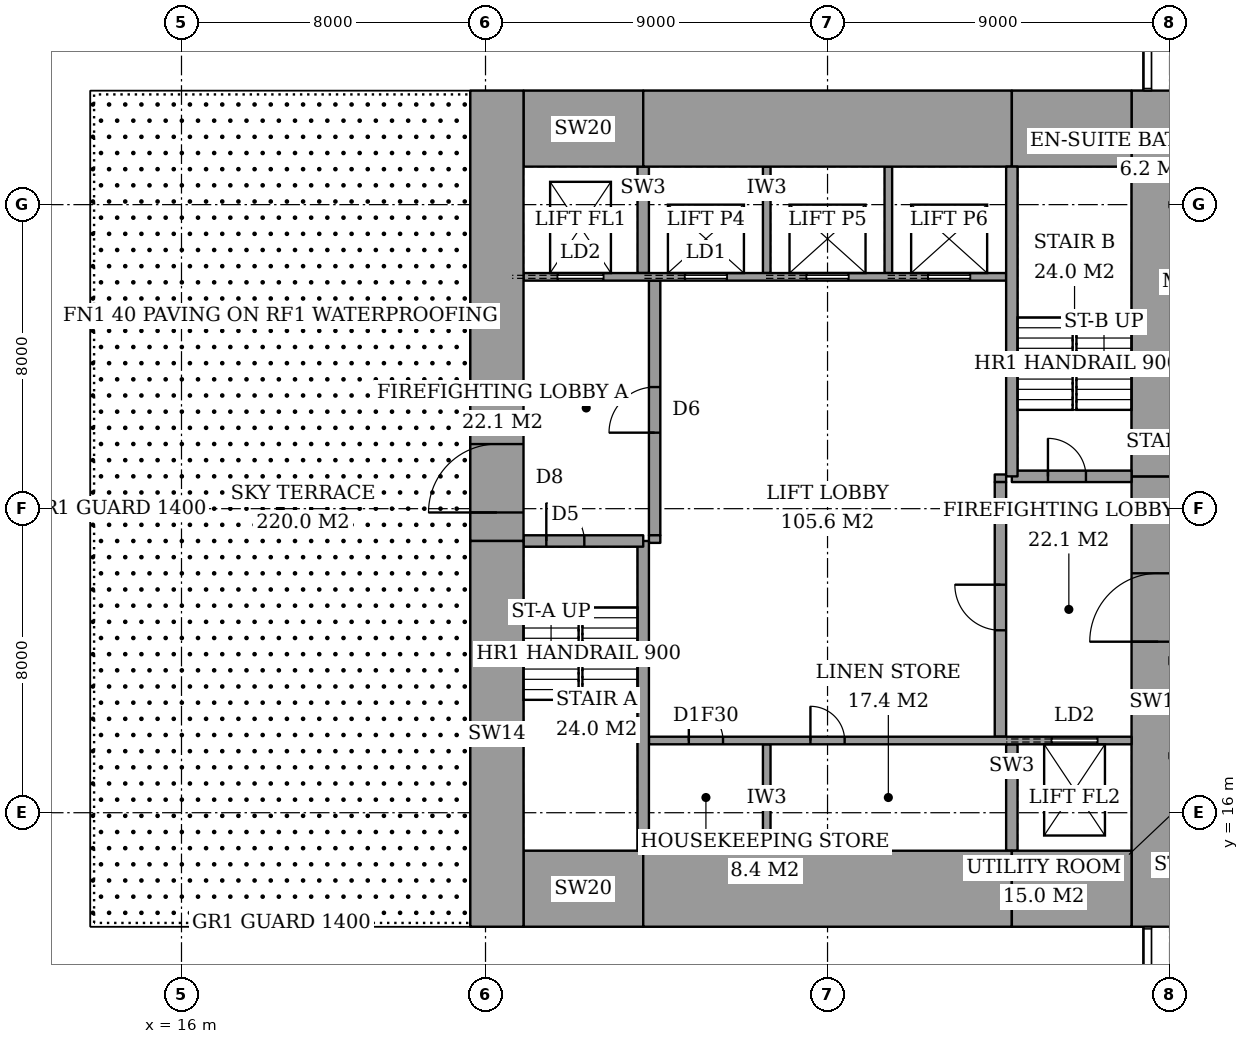
"""IFC4 building model, lengths in metres.
Left out: names, types, materials, properties, quantities, classifications, styles, units other than length and angle.
Written with IfcOpenShell. Run it as: python <this file> out.ifc"""

import sys

from ifc_helpers import new_model, si_unit, direction, frame, frame_2d, origin, place, context, subcontext, project, spatial, rectangle, extrude, element, fill, save


model = new_model("IFC4")
c1 = context("Model", 3, precision=1e-05, world=origin(), true_north=direction((0.0, 1.0)))
c2 = subcontext(c1, "Body", "Model", "MODEL_VIEW")
j1 = project(units=[si_unit("LENGTHUNIT", "METRE"), si_unit("PLANEANGLEUNIT", "RADIAN")], contexts=[c1])
p1 = place(None, origin())
s1 = spatial("IfcSite", under=j1, at=p1, CompositionType="ELEMENT")
p2 = place(p1, origin())
s2 = spatial("IfcBuilding", under=s1, at=p2, CompositionType="ELEMENT")
p3 = place(p2, frame((0.0, 0.0, 230.4)))
s3 = spatial("IfcBuildingStorey", under=s2, at=p3, CompositionType="ELEMENT", Elevation=230.4)
p4 = place(p3, frame((25.0, 14.0, 0.0), z_axis=(0.0, 0.0, 1.0), x_axis=(1.0, 0.0, 0.0)))
e1 = element("IfcWall", 1, at=p4, inside=s3, PredefinedType="SHEAR", context=c2, shape_type="SweptSolid", body=[
    extrude(rectangle(XDim=3.15, YDim=2.0, at=frame_2d((1.575, 0.0))), origin(), (0.0, 0.0, 1.0), 3.6),
])
p5 = place(p3, frame((28.15, 14.0, 0.0), z_axis=(0.0, 0.0, 1.0), x_axis=(1.0, 0.0, 0.0)))
e2 = element("IfcWall", 2, at=p5, inside=s3, PredefinedType="SHEAR", context=c2, shape_type="SweptSolid", body=[
    extrude(rectangle(XDim=9.7, YDim=2.0, at=frame_2d((4.85, 0.0))), origin(), (0.0, 0.0, 1.0), 3.6),
])
for number, where, z_axis, x_axis in (
    (3, (37.85, 14.0, 0.0), (0.0, 0.0, 1.0), (1.0, 0.0, 0.0)),
    (4, (25.0, 34.0, 0.0), (0.0, 0.0, 1.0), (1.0, 0.0, 0.0)),
):
    element("IfcWall", number, at=place(p3, frame(where, z_axis=z_axis, x_axis=x_axis)), inside=s3, PredefinedType="SHEAR", context=c2, shape_type="SweptSolid", body=[
        extrude(rectangle(XDim=3.15, YDim=2.0, at=frame_2d((1.575, 0.0))), origin(), (0.0, 0.0, 1.0), 3.6),
    ])
p6 = place(p3, frame((28.15, 34.0, 0.0), z_axis=(0.0, 0.0, 1.0), x_axis=(1.0, 0.0, 0.0)))
e5 = element("IfcWall", 5, at=p6, inside=s3, PredefinedType="SHEAR", context=c2, shape_type="SweptSolid", body=[
    extrude(rectangle(XDim=9.7, YDim=2.0, at=frame_2d((4.85, 0.0))), origin(), (0.0, 0.0, 1.0), 3.6),
])
p7 = place(p3, frame((37.85, 34.0, 0.0), z_axis=(0.0, 0.0, 1.0), x_axis=(1.0, 0.0, 0.0)))
e6 = element("IfcWall", 6, at=p7, inside=s3, PredefinedType="SHEAR", context=c2, shape_type="SweptSolid", body=[
    extrude(rectangle(XDim=3.15, YDim=2.0, at=frame_2d((1.575, 0.0))), origin(), (0.0, 0.0, 1.0), 3.6),
])
p8 = place(p3, frame((24.3, 13.0, 0.0), z_axis=(0.0, 0.0, 1.0), x_axis=(0.0, 1.0, 0.0)))
e7 = element("IfcWall", 7, at=p8, inside=s3, PredefinedType="SHEAR", context=c2, shape_type="SweptSolid", body=[
    extrude(rectangle(XDim=10.15, YDim=1.4, at=frame_2d((5.075, 0.0))), origin(), (0.0, 0.0, 1.0), 3.6),
])
p9 = place(p3, frame((24.3, 23.15, 0.0), z_axis=(0.0, 0.0, 1.0), x_axis=(0.0, 1.0, 0.0)))
e8 = element("IfcWall", 8, at=p9, inside=s3, PredefinedType="SHEAR", context=c2, shape_type="SweptSolid", body=[
    extrude(rectangle(XDim=11.85, YDim=1.4, at=frame_2d((5.925, 0.0))), origin(), (0.0, 0.0, 1.0), 3.6),
])
p10 = place(p9, frame((0.75, 0.0, 0.0)))
e9 = element("IfcOpeningElement", 9, at=p10, cuts=e8, PredefinedType="OPENING", context=c2, shape_type="SweptSolid", body=[
    extrude(rectangle(XDim=1.8, YDim=2.4, at=frame_2d((0.9, 1.2))), frame((0.0, 0.71, 0.0), z_axis=(0.0, -1.0, 0.0), x_axis=(1.0, 0.0, 0.0)), (0.0, 0.0, 1.0), 1.42),
])
p11 = place(p3, frame((41.7, 13.0, 0.0), z_axis=(0.0, 0.0, 1.0), x_axis=(0.0, 1.0, 0.0)))
e10 = element("IfcWall", 10, at=p11, inside=s3, PredefinedType="SHEAR", context=c2, shape_type="SweptSolid", body=[
    extrude(rectangle(XDim=11.85, YDim=1.4, at=frame_2d((5.925, 0.0))), origin(), (0.0, 0.0, 1.0), 3.6),
])
p12 = place(p11, frame((7.5, 0.0, 0.0)))
e11 = element("IfcOpeningElement", 11, at=p12, cuts=e10, PredefinedType="OPENING", context=c2, shape_type="SweptSolid", body=[
    extrude(rectangle(XDim=1.8, YDim=2.4, at=frame_2d((0.9, 1.2))), frame((0.0, 0.71, 0.0), z_axis=(0.0, -1.0, 0.0), x_axis=(1.0, 0.0, 0.0)), (0.0, 0.0, 1.0), 1.42),
])
p13 = place(p3, frame((41.7, 24.85, 0.0), z_axis=(0.0, 0.0, 1.0), x_axis=(0.0, 1.0, 0.0)))
e12 = element("IfcWall", 12, at=p13, inside=s3, PredefinedType="SHEAR", context=c2, shape_type="SweptSolid", body=[
    extrude(rectangle(XDim=10.15, YDim=1.4, at=frame_2d((5.075, 0.0))), origin(), (0.0, 0.0, 1.0), 3.6),
])
p14 = place(p3, frame((28.15, 15.0, 0.0), z_axis=(0.0, 0.0, 1.0), x_axis=(0.0, 1.0, 0.0)))
e13 = element("IfcWall", 13, at=p14, inside=s3, PredefinedType="SHEAR", context=c2, shape_type="SweptSolid", body=[
    extrude(rectangle(XDim=8.15, YDim=0.3, at=frame_2d((4.075, 0.0))), origin(), (0.0, 0.0, 1.0), 3.6),
])
p15 = place(p3, frame((25.0, 23.15, 0.0), z_axis=(0.0, 0.0, 1.0), x_axis=(1.0, 0.0, 0.0)))
e14 = element("IfcWall", 14, at=p15, inside=s3, PredefinedType="SHEAR", context=c2, shape_type="SweptSolid", body=[
    extrude(rectangle(XDim=3.15, YDim=0.3, at=frame_2d((1.575, 0.0))), origin(), (0.0, 0.0, 1.0), 3.6),
])
p16 = place(p15, frame((0.6, 0.0, 0.0)))
e15 = element("IfcOpeningElement", 15, at=p16, cuts=e14, PredefinedType="OPENING", context=c2, shape_type="SweptSolid", body=[
    extrude(rectangle(XDim=1.0, YDim=2.1, at=frame_2d((0.5, 1.05))), frame((0.0, 0.16, 0.0), z_axis=(0.0, -1.0, 0.0), x_axis=(1.0, 0.0, 0.0)), (0.0, 0.0, 1.0), 0.32),
])
p17 = place(p3, frame((37.85, 24.85, 0.0), z_axis=(0.0, 0.0, 1.0), x_axis=(0.0, 1.0, 0.0)))
e16 = element("IfcWall", 16, at=p17, inside=s3, PredefinedType="SHEAR", context=c2, shape_type="SweptSolid", body=[
    extrude(rectangle(XDim=8.15, YDim=0.3, at=frame_2d((4.075, 0.0))), origin(), (0.0, 0.0, 1.0), 3.6),
])
p18 = place(p3, frame((37.85, 24.85, 0.0), z_axis=(0.0, 0.0, 1.0), x_axis=(1.0, 0.0, 0.0)))
e17 = element("IfcWall", 17, at=p18, inside=s3, PredefinedType="SHEAR", context=c2, shape_type="SweptSolid", body=[
    extrude(rectangle(XDim=3.15, YDim=0.3, at=frame_2d((1.575, 0.0))), origin(), (0.0, 0.0, 1.0), 3.6),
])
p19 = place(p18, frame((0.95, 0.0, 0.0)))
e18 = element("IfcOpeningElement", 18, at=p19, cuts=e17, PredefinedType="OPENING", context=c2, shape_type="SweptSolid", body=[
    extrude(rectangle(XDim=1.0, YDim=2.1, at=frame_2d((0.5, 1.05))), frame((0.0, 0.16, 0.0), z_axis=(0.0, -1.0, 0.0), x_axis=(1.0, 0.0, 0.0)), (0.0, 0.0, 1.0), 0.32),
])
p20 = place(p3, frame((28.45, 23.3, 0.0), z_axis=(0.0, 0.0, 1.0), x_axis=(0.0, 1.0, 0.0)))
e19 = element("IfcWall", 19, at=p20, inside=s3, PredefinedType="PARTITIONING", context=c2, shape_type="SweptSolid", body=[
    extrude(rectangle(XDim=6.7, YDim=0.3, at=frame_2d((3.35, 0.0))), origin(), (0.0, 0.0, 1.0), 3.6),
])
p21 = place(p20, frame((2.7, 0.0, 0.0)))
e20 = element("IfcOpeningElement", 20, at=p21, cuts=e19, PredefinedType="OPENING", context=c2, shape_type="SweptSolid", body=[
    extrude(rectangle(XDim=1.2, YDim=2.1, at=frame_2d((0.6, 1.05))), frame((0.0, 0.16, 0.0), z_axis=(0.0, -1.0, 0.0), x_axis=(1.0, 0.0, 0.0)), (0.0, 0.0, 1.0), 0.32),
])
p22 = place(p3, frame((37.55, 18.0, 0.0), z_axis=(0.0, 0.0, 1.0), x_axis=(0.0, 1.0, 0.0)))
e21 = element("IfcWall", 21, at=p22, inside=s3, PredefinedType="PARTITIONING", context=c2, shape_type="SweptSolid", body=[
    extrude(rectangle(XDim=6.7, YDim=0.3, at=frame_2d((3.35, 0.0))), origin(), (0.0, 0.0, 1.0), 3.6),
])
p23 = place(p22, frame((2.8, 0.0, 0.0)))
e22 = element("IfcOpeningElement", 22, at=p23, cuts=e21, PredefinedType="OPENING", context=c2, shape_type="SweptSolid", body=[
    extrude(rectangle(XDim=1.2, YDim=2.1, at=frame_2d((0.6, 1.05))), frame((0.0, 0.16, 0.0), z_axis=(0.0, -1.0, 0.0), x_axis=(1.0, 0.0, 0.0)), (0.0, 0.0, 1.0), 0.32),
])
p24 = place(p3, frame((28.3, 17.9, 0.0), z_axis=(0.0, 0.0, 1.0), x_axis=(1.0, 0.0, 0.0)))
e23 = element("IfcWall", 23, at=p24, inside=s3, PredefinedType="PARTITIONING", context=c2, shape_type="SweptSolid", body=[
    extrude(rectangle(XDim=12.7, YDim=0.2, at=frame_2d((6.35, 0.0))), origin(), (0.0, 0.0, 1.0), 3.6),
])
p25 = place(p24, frame((1.05, 0.0, 0.0)))
e24 = element("IfcOpeningElement", 24, at=p25, cuts=e23, PredefinedType="OPENING", context=c2, shape_type="SweptSolid", body=[
    extrude(rectangle(XDim=0.9, YDim=2.1, at=frame_2d((0.45, 1.05))), frame((0.0, 0.11, 0.0), z_axis=(0.0, -1.0, 0.0), x_axis=(1.0, 0.0, 0.0)), (0.0, 0.0, 1.0), 0.22),
])
p26 = place(p24, frame((4.25, 0.0, 0.0)))
e25 = element("IfcOpeningElement", 25, at=p26, cuts=e23, PredefinedType="OPENING", context=c2, shape_type="SweptSolid", body=[
    extrude(rectangle(XDim=0.9, YDim=2.1, at=frame_2d((0.45, 1.05))), frame((0.0, 0.11, 0.0), z_axis=(0.0, -1.0, 0.0), x_axis=(1.0, 0.0, 0.0)), (0.0, 0.0, 1.0), 0.22),
])
p27 = place(p24, frame((10.6, 0.0, 0.0)))
e26 = element("IfcOpeningElement", 26, at=p27, cuts=e23, PredefinedType="OPENING", context=c2, shape_type="SweptSolid", body=[
    extrude(rectangle(XDim=1.2, YDim=2.1, at=frame_2d((0.6, 1.05))), frame((0.0, 0.11, 0.0), z_axis=(0.0, -1.0, 0.0), x_axis=(1.0, 0.0, 0.0)), (0.0, 0.0, 1.0), 0.22),
])
p28 = place(p3, frame((25.0, 30.1, 0.0), z_axis=(0.0, 0.0, 1.0), x_axis=(1.0, 0.0, 0.0)))
e27 = element("IfcWall", 27, at=p28, inside=s3, PredefinedType="PARTITIONING", context=c2, shape_type="SweptSolid", body=[
    extrude(rectangle(XDim=12.7, YDim=0.2, at=frame_2d((6.35, 0.0))), origin(), (0.0, 0.0, 1.0), 3.6),
])
p29 = place(p28, frame((4.25, 0.0, 0.0)))
e28 = element("IfcOpeningElement", 28, at=p29, cuts=e27, PredefinedType="OPENING", context=c2, shape_type="SweptSolid", body=[
    extrude(rectangle(XDim=1.1, YDim=2.1, at=frame_2d((0.55, 1.05))), frame((0.0, 0.11, 0.0), z_axis=(0.0, -1.0, 0.0), x_axis=(1.0, 0.0, 0.0)), (0.0, 0.0, 1.0), 0.22),
])
p30 = place(p28, frame((7.45, 0.0, 0.0)))
e29 = element("IfcOpeningElement", 29, at=p30, cuts=e27, PredefinedType="OPENING", context=c2, shape_type="SweptSolid", body=[
    extrude(rectangle(XDim=1.1, YDim=2.1, at=frame_2d((0.55, 1.05))), frame((0.0, 0.11, 0.0), z_axis=(0.0, -1.0, 0.0), x_axis=(1.0, 0.0, 0.0)), (0.0, 0.0, 1.0), 0.22),
])
p31 = place(p28, frame((10.65, 0.0, 0.0)))
e30 = element("IfcOpeningElement", 30, at=p31, cuts=e27, PredefinedType="OPENING", context=c2, shape_type="SweptSolid", body=[
    extrude(rectangle(XDim=1.1, YDim=2.1, at=frame_2d((0.55, 1.05))), frame((0.0, 0.11, 0.0), z_axis=(0.0, -1.0, 0.0), x_axis=(1.0, 0.0, 0.0)), (0.0, 0.0, 1.0), 0.22),
])
p32 = place(p28, frame((0.9, 0.0, 0.0)))
e31 = element("IfcOpeningElement", 31, at=p32, cuts=e27, PredefinedType="OPENING", context=c2, shape_type="SweptSolid", body=[
    extrude(rectangle(XDim=1.2, YDim=2.1, at=frame_2d((0.6, 1.05))), frame((0.0, 0.11, 0.0), z_axis=(0.0, -1.0, 0.0), x_axis=(1.0, 0.0, 0.0)), (0.0, 0.0, 1.0), 0.22),
])
p33 = place(p3, frame((31.4, 15.0, 0.0), z_axis=(0.0, 0.0, 1.0), x_axis=(0.0, 1.0, 0.0)))
e32 = element("IfcWall", 32, at=p33, inside=s3, PredefinedType="PARTITIONING", context=c2, shape_type="SweptSolid", body=[
    extrude(rectangle(XDim=2.8, YDim=0.2, at=frame_2d((1.4, 0.0))), origin(), (0.0, 0.0, 1.0), 3.6),
])
p34 = place(p3, frame((37.85, 15.0, 0.0), z_axis=(0.0, 0.0, 1.0), x_axis=(0.0, 1.0, 0.0)))
e33 = element("IfcWall", 33, at=p34, inside=s3, PredefinedType="SHEAR", context=c2, shape_type="SweptSolid", body=[
    extrude(rectangle(XDim=2.8, YDim=0.3, at=frame_2d((1.4, 0.0))), origin(), (0.0, 0.0, 1.0), 3.6),
])
for number, where, z_axis, x_axis in (
    (34, (31.4, 30.2, 0.0), (0.0, 0.0, 1.0), (0.0, 1.0, 0.0)),
    (35, (34.6, 30.2, 0.0), (0.0, 0.0, 1.0), (0.0, 1.0, 0.0)),
):
    element("IfcWall", number, at=place(p3, frame(where, z_axis=z_axis, x_axis=x_axis)), inside=s3, PredefinedType="PARTITIONING", context=c2, shape_type="SweptSolid", body=[
        extrude(rectangle(XDim=2.8, YDim=0.2, at=frame_2d((1.4, 0.0))), origin(), (0.0, 0.0, 1.0), 3.6),
    ])
p35 = place(p3, frame((28.15, 30.2, 0.0), z_axis=(0.0, 0.0, 1.0), x_axis=(0.0, 1.0, 0.0)))
e36 = element("IfcWall", 36, at=p35, inside=s3, PredefinedType="SHEAR", context=c2, shape_type="SweptSolid", body=[
    extrude(rectangle(XDim=2.8, YDim=0.3, at=frame_2d((1.4, 0.0))), origin(), (0.0, 0.0, 1.0), 3.6),
])
for number, where, z_axis, x_axis in (
    (37, (28.3, 23.2, 0.0), (0.0, 0.0, 1.0), (1.0, 0.0, 0.0)),
    (38, (37.4, 24.8, 0.0), (0.0, 0.0, 1.0), (1.0, 0.0, 0.0)),
):
    element("IfcWall", number, at=place(p3, frame(where, z_axis=z_axis, x_axis=x_axis)), inside=s3, PredefinedType="PARTITIONING", context=c2, shape_type="SweptSolid", body=[
        extrude(rectangle(XDim=0.3, YDim=0.2, at=frame_2d((0.15, 0.0))), origin(), (0.0, 0.0, 1.0), 3.6),
    ])
p36 = place(p16, origin())
e39 = element("IfcDoor", 39, at=p36, inside=s3, OperationType="SINGLE_SWING_RIGHT", PredefinedType="DOOR", context=c2, shape_type="SweptSolid", body=[
    extrude(rectangle(XDim=1.0, YDim=2.1, at=frame_2d((0.5, 1.05))), frame((0.0, 0.025, 0.0), z_axis=(0.0, -1.0, 0.0), x_axis=(1.0, 0.0, 0.0)), (0.0, 0.0, 1.0), 0.05),
])
fill(e15, e39)
p37 = place(p19, origin())
e40 = element("IfcDoor", 40, at=p37, inside=s3, OperationType="SINGLE_SWING_RIGHT", PredefinedType="DOOR", context=c2, shape_type="SweptSolid", body=[
    extrude(rectangle(XDim=1.0, YDim=2.1, at=frame_2d((0.5, 1.05))), frame((0.0, 0.025, 0.0), z_axis=(0.0, -1.0, 0.0), x_axis=(1.0, 0.0, 0.0)), (0.0, 0.0, 1.0), 0.05),
])
fill(e18, e40)
p38 = place(p21, origin())
e41 = element("IfcDoor", 41, at=p38, inside=s3, OperationType="SINGLE_SWING_RIGHT", PredefinedType="DOOR", context=c2, shape_type="SweptSolid", body=[
    extrude(rectangle(XDim=1.2, YDim=2.1, at=frame_2d((0.6, 1.05))), frame((0.0, 0.025, 0.0), z_axis=(0.0, -1.0, 0.0), x_axis=(1.0, 0.0, 0.0)), (0.0, 0.0, 1.0), 0.05),
])
fill(e20, e41)
p39 = place(p23, origin())
e42 = element("IfcDoor", 42, at=p39, inside=s3, OperationType="SINGLE_SWING_LEFT", PredefinedType="DOOR", context=c2, shape_type="SweptSolid", body=[
    extrude(rectangle(XDim=1.2, YDim=2.1, at=frame_2d((0.6, 1.05))), frame((0.0, 0.025, 0.0), z_axis=(0.0, -1.0, 0.0), x_axis=(1.0, 0.0, 0.0)), (0.0, 0.0, 1.0), 0.05),
])
fill(e22, e42)
p40 = place(p10, origin())
e43 = element("IfcDoor", 43, at=p40, inside=s3, OperationType="DOUBLE_DOOR_DOUBLE_SWING", PredefinedType="DOOR", context=c2, shape_type="SweptSolid", body=[
    extrude(rectangle(XDim=1.8, YDim=2.4, at=frame_2d((0.9, 1.2))), frame((0.0, 0.65, 0.0), z_axis=(0.0, -1.0, 0.0), x_axis=(1.0, 0.0, 0.0)), (0.0, 0.0, 1.0), 0.05),
])
fill(e9, e43)
p41 = place(p12, origin())
e44 = element("IfcDoor", 44, at=p41, inside=s3, OperationType="DOUBLE_DOOR_DOUBLE_SWING", PredefinedType="DOOR", context=c2, shape_type="SweptSolid", body=[
    extrude(rectangle(XDim=1.8, YDim=2.4, at=frame_2d((0.9, 1.2))), frame((0.0, 0.025, 0.0), z_axis=(0.0, -1.0, 0.0), x_axis=(1.0, 0.0, 0.0)), (0.0, 0.0, 1.0), 0.05),
])
fill(e11, e44)
p42 = place(p25, origin())
e45 = element("IfcDoor", 45, at=p42, inside=s3, OperationType="SINGLE_SWING_RIGHT", PredefinedType="DOOR", context=c2, shape_type="SweptSolid", body=[
    extrude(rectangle(XDim=0.9, YDim=2.1, at=frame_2d((0.45, 1.05))), frame((0.0, 0.025, 0.0), z_axis=(0.0, -1.0, 0.0), x_axis=(1.0, 0.0, 0.0)), (0.0, 0.0, 1.0), 0.05),
])
fill(e24, e45)
p43 = place(p26, origin())
e46 = element("IfcDoor", 46, at=p43, inside=s3, OperationType="SINGLE_SWING_RIGHT", PredefinedType="DOOR", context=c2, shape_type="SweptSolid", body=[
    extrude(rectangle(XDim=0.9, YDim=2.1, at=frame_2d((0.45, 1.05))), frame((0.0, 0.025, 0.0), z_axis=(0.0, -1.0, 0.0), x_axis=(1.0, 0.0, 0.0)), (0.0, 0.0, 1.0), 0.05),
])
fill(e25, e46)
p44 = place(p29, origin())
e47 = element("IfcDoor", 47, at=p44, inside=s3, OperationType="SLIDING_TO_LEFT", PredefinedType="DOOR", context=c2, shape_type="SweptSolid", body=[
    extrude(rectangle(XDim=1.1, YDim=2.1, at=frame_2d((0.55, 1.05))), frame((0.0, 0.025, 0.0), z_axis=(0.0, -1.0, 0.0), x_axis=(1.0, 0.0, 0.0)), (0.0, 0.0, 1.0), 0.05),
])
fill(e28, e47)
p45 = place(p30, origin())
e48 = element("IfcDoor", 48, at=p45, inside=s3, OperationType="SLIDING_TO_LEFT", PredefinedType="DOOR", context=c2, shape_type="SweptSolid", body=[
    extrude(rectangle(XDim=1.1, YDim=2.1, at=frame_2d((0.55, 1.05))), frame((0.0, 0.025, 0.0), z_axis=(0.0, -1.0, 0.0), x_axis=(1.0, 0.0, 0.0)), (0.0, 0.0, 1.0), 0.05),
])
fill(e29, e48)
p46 = place(p31, origin())
e49 = element("IfcDoor", 49, at=p46, inside=s3, OperationType="SLIDING_TO_LEFT", PredefinedType="DOOR", context=c2, shape_type="SweptSolid", body=[
    extrude(rectangle(XDim=1.1, YDim=2.1, at=frame_2d((0.55, 1.05))), frame((0.0, 0.025, 0.0), z_axis=(0.0, -1.0, 0.0), x_axis=(1.0, 0.0, 0.0)), (0.0, 0.0, 1.0), 0.05),
])
fill(e30, e49)
p47 = place(p32, origin())
e50 = element("IfcDoor", 50, at=p47, inside=s3, OperationType="SLIDING_TO_LEFT", PredefinedType="DOOR", context=c2, shape_type="SweptSolid", body=[
    extrude(rectangle(XDim=1.2, YDim=2.1, at=frame_2d((0.6, 1.05))), frame((0.0, 0.025, 0.0), z_axis=(0.0, -1.0, 0.0), x_axis=(1.0, 0.0, 0.0)), (0.0, 0.0, 1.0), 0.05),
])
fill(e31, e50)
p48 = place(p27, origin())
e51 = element("IfcDoor", 51, at=p48, inside=s3, OperationType="SLIDING_TO_LEFT", PredefinedType="DOOR", context=c2, shape_type="SweptSolid", body=[
    extrude(rectangle(XDim=1.2, YDim=2.1, at=frame_2d((0.6, 1.05))), frame((0.0, 0.025, 0.0), z_axis=(0.0, -1.0, 0.0), x_axis=(1.0, 0.0, 0.0)), (0.0, 0.0, 1.0), 0.05),
])
fill(e26, e51)
save(model, sys.argv[1])
